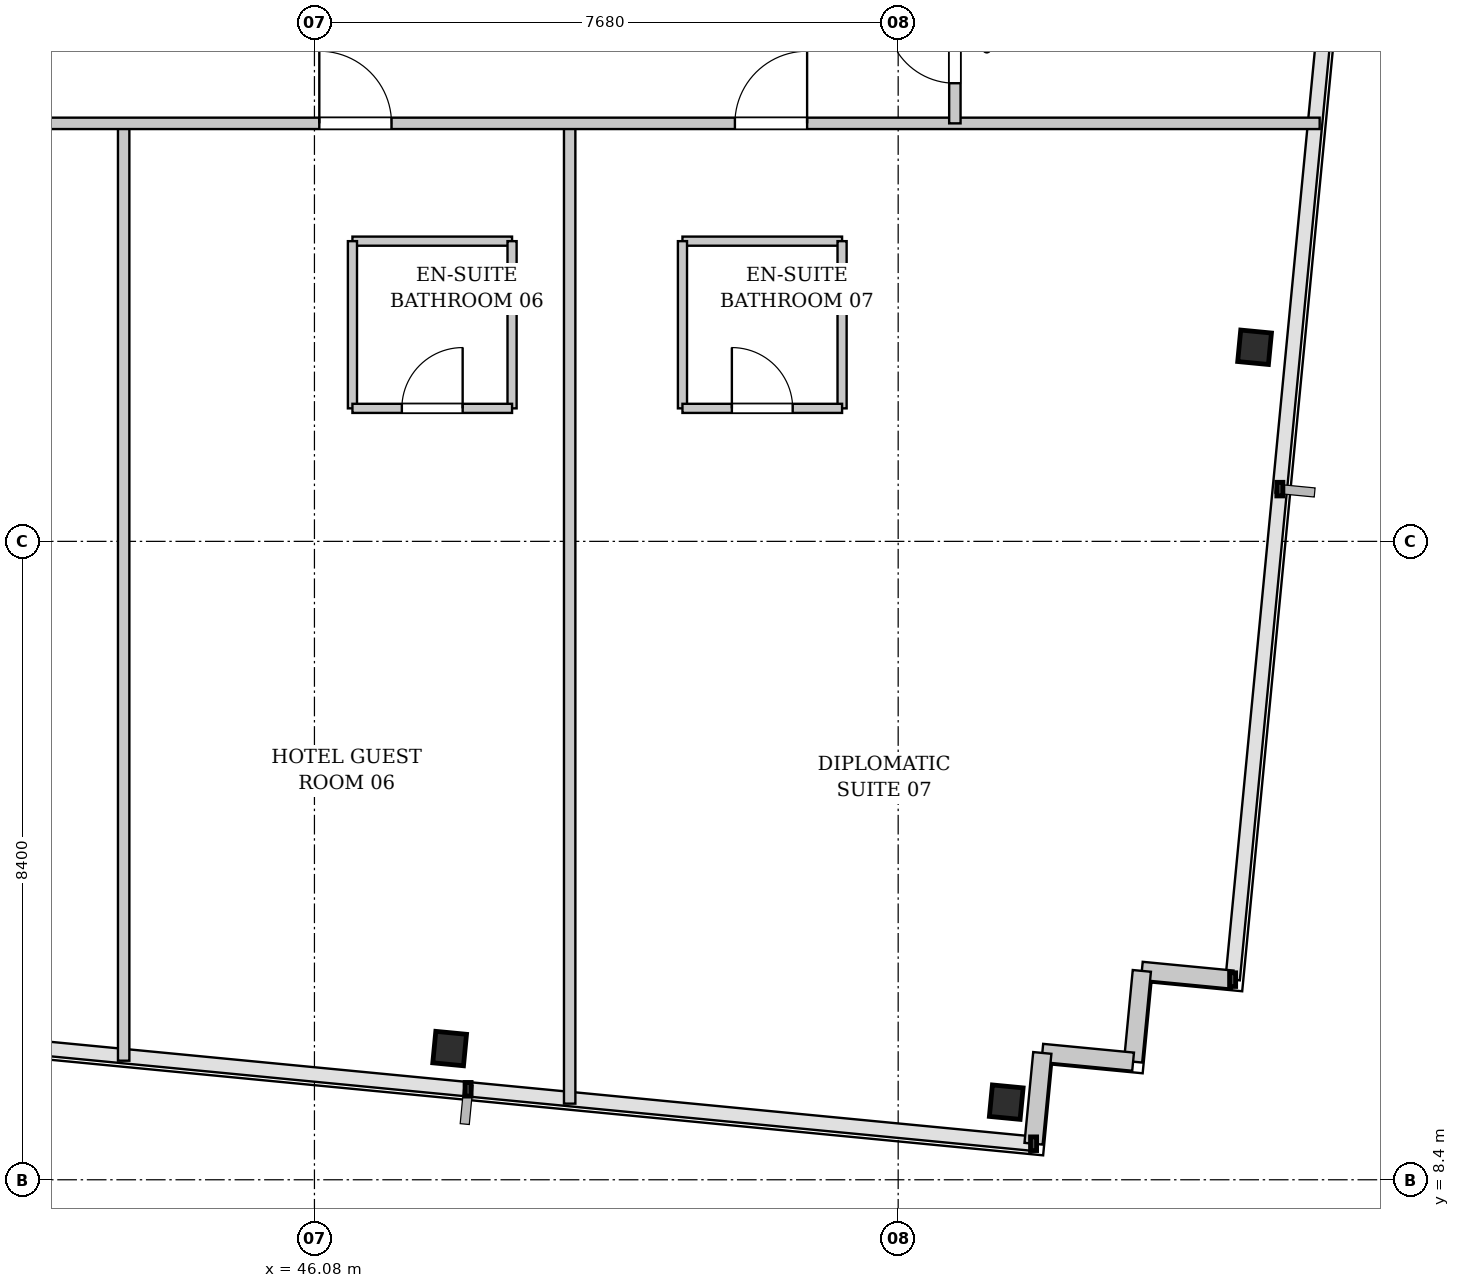
"""IFC4 building model, lengths in metres.
Left out: names, types, materials, properties, quantities, classifications, styles, units other than length and angle.
Written with IfcOpenShell. Run it as: python <this file> out.ifc"""

import sys

from ifc_helpers import new_model, si_unit, direction, frame, frame_2d, origin, origin_2d, place, context, subcontext, project, spatial, rectangle, i_section, extrude, element, fill, save


model = new_model("IFC4")
c1 = context("Model", 3, precision=1e-05, world=origin(), true_north=direction((0.0, 1.0)))
c2 = subcontext(c1, "Body", "Model", "MODEL_VIEW")
j1 = project(units=[si_unit("LENGTHUNIT", "METRE"), si_unit("PLANEANGLEUNIT", "RADIAN")], contexts=[c1])
p1 = place(None, origin())
s1 = spatial("IfcSite", under=j1, at=p1, CompositionType="ELEMENT")
p2 = place(p1, origin())
s2 = spatial("IfcBuilding", under=s1, at=p2, CompositionType="ELEMENT")
p3 = place(p2, frame((0.0, 0.0, 165.5)))
s3 = spatial("IfcBuildingStorey", under=s2, at=p3, CompositionType="ELEMENT", Elevation=165.5)
for number, where, z_axis, x_axis in (
    (1, (47.859, 10.126, 0.0), (0.0, 0.0, 1.0), (0.995, -0.096, 0.0)),
    (2, (55.182, 9.421, 0.0), (0.0, 0.0, 1.0), (0.995, -0.096, 0.0)),
    (3, (58.449, 19.354, 0.0), (0.0, 0.0, 1.0), (0.995, -0.096, 0.0)),
):
    element("IfcColumn", number, at=place(p3, frame(where, z_axis=z_axis, x_axis=x_axis)), inside=s3, PredefinedType="COLUMN", context=c2, shape_type="SweptSolid", body=[
        extrude(i_section(OverallWidth=0.406, OverallDepth=0.416, WebThickness=0.03, FlangeThickness=0.048, FilletRadius=0.015, at=origin_2d()), origin(), (0.0, 0.0, 1.0), 3.3),
    ])
p4 = place(p3, frame((58.16, 11.033, 0.0), z_axis=(0.0, 0.0, 1.0), x_axis=(-0.995398960025, 0.095817067274, 0.0)))
e4 = element("IfcWall", 4, at=p4, inside=s3, PredefinedType="SOLIDWALL", context=c2, shape_type="SweptSolid", body=[
    extrude(rectangle(XDim=1.2, YDim=0.24, at=frame_2d((0.6, 0.0))), origin(), (0.0, 0.0, 1.0), 3.08),
])
for number, where, z_axis, x_axis in (
    (5, (56.966, 11.148, 0.0), (0.0, 0.0, 1.0), (-0.096, -0.995, 0.0)),
    (6, (56.851, 9.954, 0.0), (0.0, 0.0, 1.0), (-0.995, 0.096, 0.0)),
):
    element("IfcWall", number, at=place(p3, frame(where, z_axis=z_axis, x_axis=x_axis)), inside=s3, PredefinedType="SOLIDWALL", context=c2, shape_type="SweptSolid", body=[
        extrude(rectangle(XDim=1.2, YDim=0.24, at=frame_2d((0.6, 0.0))), origin(), (0.0, 0.0, 1.0), 3.08),
    ])
p5 = place(p3, frame((55.656, 10.069, 0.0), z_axis=(0.0, 0.0, 1.0), x_axis=(-0.095817067274, -0.995398960025, 0.0)))
e7 = element("IfcWall", 7, at=p5, inside=s3, PredefinedType="SOLIDWALL", context=c2, shape_type="SweptSolid", body=[
    extrude(rectangle(XDim=1.2, YDim=0.24, at=frame_2d((0.6, 0.0))), origin(), (0.0, 0.0, 1.0), 3.08),
])
p6 = place(p3, frame((46.58, 20.75, 0.0), z_axis=(0.0, 0.0, 1.0), x_axis=(1.0, 0.0, 0.0)))
e8 = element("IfcWall", 8, at=p6, inside=s3, PredefinedType="PARTITIONING", context=c2, shape_type="SweptSolid", body=[
    extrude(rectangle(XDim=2.1, YDim=0.12, at=frame_2d((1.05, 0.0))), origin(), (0.0, 0.0, 1.0), 3.08),
])
p7 = place(p3, frame((46.58, 18.55, 0.0), z_axis=(0.0, 0.0, 1.0), x_axis=(0.0, 1.0, 0.0)))
e9 = element("IfcWall", 9, at=p7, inside=s3, PredefinedType="PARTITIONING", context=c2, shape_type="SweptSolid", body=[
    extrude(rectangle(XDim=2.2, YDim=0.12, at=frame_2d((1.1, 0.0))), origin(), (0.0, 0.0, 1.0), 2.475),
])
p8 = place(p3, frame((48.68, 18.55, 0.0), z_axis=(0.0, 0.0, 1.0), x_axis=(0.0, 1.0, 0.0)))
e10 = element("IfcWall", 10, at=p8, inside=s3, PredefinedType="PARTITIONING", context=c2, shape_type="SweptSolid", body=[
    extrude(rectangle(XDim=2.2, YDim=0.12, at=frame_2d((1.1, 0.0))), origin(), (0.0, 0.0, 1.0), 3.08),
])
p9 = place(p3, frame((46.58, 18.55, 0.0), z_axis=(0.0, 0.0, 1.0), x_axis=(1.0, 0.0, 0.0)))
e11 = element("IfcWall", 11, at=p9, inside=s3, PredefinedType="PARTITIONING", context=c2, shape_type="SweptSolid", body=[
    extrude(rectangle(XDim=2.1, YDim=0.12, at=frame_2d((1.05, 0.0))), origin(), (0.0, 0.0, 1.0), 3.08),
])
p10 = place(p9, frame((0.65, 0.0, 0.0)))
e12 = element("IfcOpeningElement", 12, at=p10, cuts=e11, PredefinedType="OPENING", context=c2, shape_type="SweptSolid", body=[
    extrude(rectangle(XDim=0.8, YDim=2.1, at=frame_2d((0.4, 1.05))), frame((0.0, 0.07, 0.0), z_axis=(0.0, -1.0, 0.0), x_axis=(1.0, 0.0, 0.0)), (0.0, 0.0, 1.0), 0.14),
])
p11 = place(p3, frame((43.57, 9.967, 0.0), z_axis=(0.0, 0.0, 1.0), x_axis=(0.0, 1.0, 0.0)))
e13 = element("IfcWall", 13, at=p11, inside=s3, PredefinedType="PARTITIONING", context=c2, shape_type="SweptSolid", body=[
    extrude(rectangle(XDim=12.353, YDim=0.15, at=frame_2d((6.177, 0.0))), origin(), (0.0, 0.0, 1.0), 3.08),
])
p12 = place(p3, frame((50.922, 20.75, 0.0), z_axis=(0.0, 0.0, 1.0), x_axis=(1.0, 0.0, 0.0)))
e14 = element("IfcWall", 14, at=p12, inside=s3, PredefinedType="PARTITIONING", context=c2, shape_type="SweptSolid", body=[
    extrude(rectangle(XDim=2.1, YDim=0.12, at=frame_2d((1.05, 0.0))), origin(), (0.0, 0.0, 1.0), 3.08),
])
for number, where, z_axis, x_axis in (
    (15, (50.922, 18.55, 0.0), (0.0, 0.0, 1.0), (0.0, 1.0, 0.0)),
    (16, (53.022, 18.55, 0.0), (0.0, 0.0, 1.0), (0.0, 1.0, 0.0)),
):
    element("IfcWall", number, at=place(p3, frame(where, z_axis=z_axis, x_axis=x_axis)), inside=s3, PredefinedType="PARTITIONING", context=c2, shape_type="SweptSolid", body=[
        extrude(rectangle(XDim=2.2, YDim=0.12, at=frame_2d((1.1, 0.0))), origin(), (0.0, 0.0, 1.0), 3.08),
    ])
p13 = place(p3, frame((50.922, 18.55, 0.0), z_axis=(0.0, 0.0, 1.0), x_axis=(1.0, 0.0, 0.0)))
e17 = element("IfcWall", 17, at=p13, inside=s3, PredefinedType="PARTITIONING", context=c2, shape_type="SweptSolid", body=[
    extrude(rectangle(XDim=2.1, YDim=0.12, at=frame_2d((1.05, 0.0))), origin(), (0.0, 0.0, 1.0), 3.08),
])
p14 = place(p13, frame((0.65, 0.0, 0.0)))
e18 = element("IfcOpeningElement", 18, at=p14, cuts=e17, PredefinedType="OPENING", context=c2, shape_type="SweptSolid", body=[
    extrude(rectangle(XDim=0.8, YDim=2.1, at=frame_2d((0.4, 1.05))), frame((0.0, 0.07, 0.0), z_axis=(0.0, -1.0, 0.0), x_axis=(1.0, 0.0, 0.0)), (0.0, 0.0, 1.0), 0.14),
])
p15 = place(p3, frame((49.438, 9.402, 0.0), z_axis=(0.0, 0.0, 1.0), x_axis=(0.0, 1.0, 0.0)))
e19 = element("IfcWall", 19, at=p15, inside=s3, PredefinedType="PARTITIONING", context=c2, shape_type="SweptSolid", body=[
    extrude(rectangle(XDim=12.918, YDim=0.15, at=frame_2d((6.459, 0.0))), origin(), (0.0, 0.0, 1.0), 3.08),
])
p16 = place(p3, frame((1.801, 22.3, 0.0), z_axis=(0.0, 0.0, 1.0), x_axis=(1.0, 0.0, 0.0)))
e20 = element("IfcWall", 20, at=p16, inside=s3, PredefinedType="PARTITIONING", context=c2, shape_type="SweptSolid", body=[
    extrude(rectangle(XDim=57.505, YDim=0.15, at=frame_2d((28.752, 0.0))), origin(), (0.0, 0.0, 1.0), 3.08),
])
p17 = place(p16, frame((8.731, 0.0, 0.0)))
e21 = element("IfcOpeningElement", 21, at=p17, cuts=e20, PredefinedType="OPENING", context=c2, shape_type="SweptSolid", body=[
    extrude(rectangle(XDim=0.95, YDim=2.15, at=frame_2d((0.475, 1.075))), frame((0.0, 0.085, 0.0), z_axis=(0.0, -1.0, 0.0), x_axis=(1.0, 0.0, 0.0)), (0.0, 0.0, 1.0), 0.17),
])
p18 = place(p16, frame((13.714, 0.0, 0.0)))
e22 = element("IfcOpeningElement", 22, at=p18, cuts=e20, PredefinedType="OPENING", context=c2, shape_type="SweptSolid", body=[
    extrude(rectangle(XDim=0.95, YDim=2.15, at=frame_2d((0.475, 1.075))), frame((0.0, 0.085, 0.0), z_axis=(0.0, -1.0, 0.0), x_axis=(1.0, 0.0, 0.0)), (0.0, 0.0, 1.0), 0.17),
])
p19 = place(p16, frame((20.506, 0.0, 0.0)))
e23 = element("IfcOpeningElement", 23, at=p19, cuts=e20, PredefinedType="OPENING", context=c2, shape_type="SweptSolid", body=[
    extrude(rectangle(XDim=0.95, YDim=2.15, at=frame_2d((0.475, 1.075))), frame((0.0, 0.085, 0.0), z_axis=(0.0, -1.0, 0.0), x_axis=(1.0, 0.0, 0.0)), (0.0, 0.0, 1.0), 0.17),
])
p20 = place(p16, frame((28.808, 0.0, 0.0)))
e24 = element("IfcOpeningElement", 24, at=p20, cuts=e20, PredefinedType="OPENING", context=c2, shape_type="SweptSolid", body=[
    extrude(rectangle(XDim=0.95, YDim=2.15, at=frame_2d((0.475, 1.075))), frame((0.0, 0.085, 0.0), z_axis=(0.0, -1.0, 0.0), x_axis=(1.0, 0.0, 0.0)), (0.0, 0.0, 1.0), 0.17),
])
p21 = place(p16, frame((37.209, 0.0, 0.0)))
e25 = element("IfcOpeningElement", 25, at=p21, cuts=e20, PredefinedType="OPENING", context=c2, shape_type="SweptSolid", body=[
    extrude(rectangle(XDim=0.95, YDim=2.15, at=frame_2d((0.475, 1.075))), frame((0.0, 0.085, 0.0), z_axis=(0.0, -1.0, 0.0), x_axis=(1.0, 0.0, 0.0)), (0.0, 0.0, 1.0), 0.17),
])
p22 = place(p16, frame((44.343, 0.0, 0.0)))
e26 = element("IfcOpeningElement", 26, at=p22, cuts=e20, PredefinedType="OPENING", context=c2, shape_type="SweptSolid", body=[
    extrude(rectangle(XDim=0.95, YDim=2.15, at=frame_2d((0.475, 1.075))), frame((0.0, 0.085, 0.0), z_axis=(0.0, -1.0, 0.0), x_axis=(1.0, 0.0, 0.0)), (0.0, 0.0, 1.0), 0.17),
])
p23 = place(p16, frame((49.811, 0.0, 0.0)))
e27 = element("IfcOpeningElement", 27, at=p23, cuts=e20, PredefinedType="OPENING", context=c2, shape_type="SweptSolid", body=[
    extrude(rectangle(XDim=0.95, YDim=2.15, at=frame_2d((0.475, 1.075))), frame((0.0, 0.085, 0.0), z_axis=(0.0, -1.0, 0.0), x_axis=(1.0, 0.0, 0.0)), (0.0, 0.0, 1.0), 0.17),
])
p24 = place(p3, frame((54.506, 22.3, 0.0), z_axis=(0.0, 0.0, 1.0), x_axis=(0.0, 1.0, 0.0)))
e28 = element("IfcWall", 28, at=p24, inside=s3, PredefinedType="PARTITIONING", context=c2, shape_type="SweptSolid", body=[
    extrude(rectangle(XDim=24.126, YDim=0.15, at=frame_2d((12.063, 0.0))), origin(), (0.0, 0.0, 1.0), 3.08),
])
p25 = place(p24, frame((0.528, 0.0, 0.0)))
e29 = element("IfcOpeningElement", 29, at=p25, cuts=e28, PredefinedType="OPENING", context=c2, shape_type="SweptSolid", body=[
    extrude(rectangle(XDim=0.9, YDim=2.15, at=frame_2d((0.45, 1.075))), frame((0.0, 0.085, 0.0), z_axis=(0.0, -1.0, 0.0), x_axis=(1.0, 0.0, 0.0)), (0.0, 0.0, 1.0), 0.17),
])
p26 = place(p10, origin())
e30 = element("IfcDoor", 30, at=p26, inside=s3, OperationType="SINGLE_SWING_RIGHT", PredefinedType="DOOR", context=c2, shape_type="SweptSolid", body=[
    extrude(rectangle(XDim=0.8, YDim=2.1, at=frame_2d((0.4, 1.05))), frame((0.0, 0.025, 0.0), z_axis=(0.0, -1.0, 0.0), x_axis=(1.0, 0.0, 0.0)), (0.0, 0.0, 1.0), 0.05),
])
fill(e12, e30)
p27 = place(p14, origin())
e31 = element("IfcDoor", 31, at=p27, inside=s3, OperationType="SINGLE_SWING_LEFT", PredefinedType="DOOR", context=c2, shape_type="SweptSolid", body=[
    extrude(rectangle(XDim=0.8, YDim=2.1, at=frame_2d((0.4, 1.05))), frame((0.0, 0.025, 0.0), z_axis=(0.0, -1.0, 0.0), x_axis=(1.0, 0.0, 0.0)), (0.0, 0.0, 1.0), 0.05),
])
fill(e18, e31)
p28 = place(p22, origin())
e32 = element("IfcDoor", 32, at=p28, inside=s3, OperationType="SINGLE_SWING_LEFT", PredefinedType="DOOR", context=c2, shape_type="SweptSolid", body=[
    extrude(rectangle(XDim=0.95, YDim=2.15, at=frame_2d((0.475, 1.075))), frame((0.0, 0.025, 0.0), z_axis=(0.0, -1.0, 0.0), x_axis=(1.0, 0.0, 0.0)), (0.0, 0.0, 1.0), 0.05),
])
fill(e26, e32)
p29 = place(p23, origin())
e33 = element("IfcDoor", 33, at=p29, inside=s3, OperationType="SINGLE_SWING_RIGHT", PredefinedType="DOOR", context=c2, shape_type="SweptSolid", body=[
    extrude(rectangle(XDim=0.95, YDim=2.15, at=frame_2d((0.475, 1.075))), frame((0.0, 0.025, 0.0), z_axis=(0.0, -1.0, 0.0), x_axis=(1.0, 0.0, 0.0)), (0.0, 0.0, 1.0), 0.05),
])
fill(e27, e33)
p30 = place(p25, origin())
e34 = element("IfcDoor", 34, at=p30, inside=s3, OperationType="SINGLE_SWING_RIGHT", PredefinedType="DOOR", context=c2, shape_type="SweptSolid", body=[
    extrude(rectangle(XDim=0.9, YDim=2.15, at=frame_2d((0.45, 1.075))), frame((0.0, 0.025, 0.0), z_axis=(0.0, -1.0, 0.0), x_axis=(1.0, 0.0, 0.0)), (0.0, 0.0, 1.0), 0.05),
])
fill(e29, e34)
save(model, sys.argv[1])
